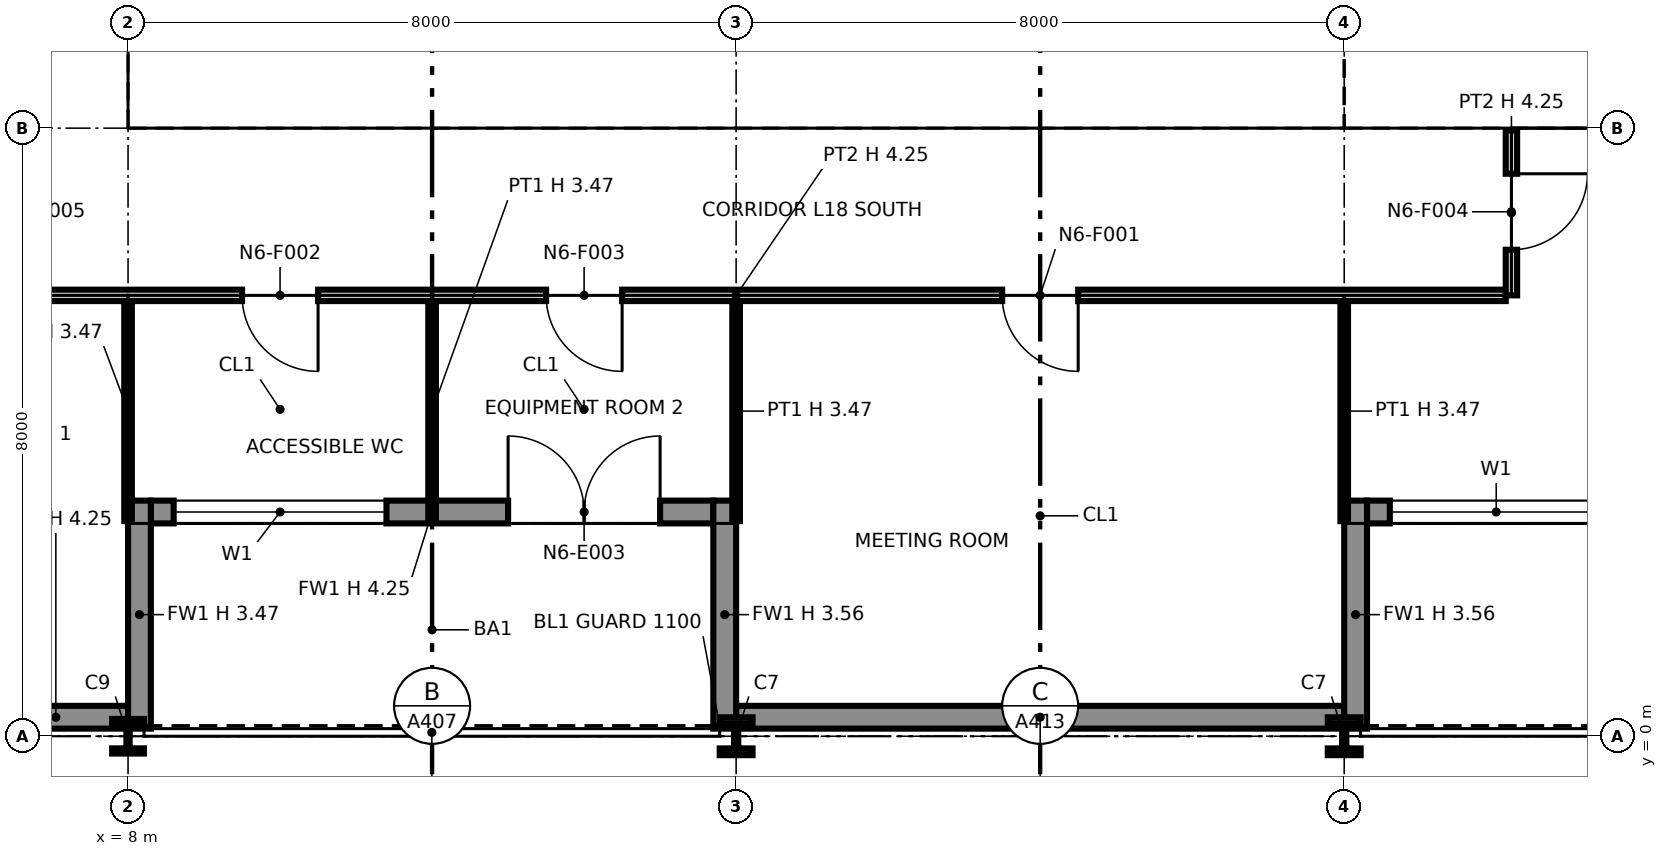
"""IFC4 building model, lengths in metres.
Left out: names, types, materials, properties, quantities, classifications, styles, units other than length and angle.
Written with IfcOpenShell. Run it as: python <this file> out.ifc"""

import sys

from ifc_helpers import new_model, si_unit, direction, frame, frame_2d, origin, origin_2d, place, context, subcontext, project, spatial, polyline, rectangle, i_section, outline, extrude, element, fill, save


model = new_model("IFC4")
c1 = context("Model", 3, precision=1e-05, world=origin(), true_north=direction((0.0, 1.0)))
c2 = subcontext(c1, "Body", "Model", "MODEL_VIEW")
j1 = project(units=[si_unit("LENGTHUNIT", "METRE"), si_unit("PLANEANGLEUNIT", "RADIAN")], contexts=[c1])
p1 = place(None, origin())
s1 = spatial("IfcSite", under=j1, at=p1, CompositionType="ELEMENT")
p2 = place(p1, origin())
s2 = spatial("IfcBuilding", under=s1, at=p2, CompositionType="ELEMENT")
p3 = place(p2, frame((0.0, 0.0, 96.4)))
s3 = spatial("IfcBuildingStorey", under=s2, at=p3, CompositionType="ELEMENT", Elevation=96.4)
p4 = place(p3, frame((8.0, 0.0, 0.0), z_axis=(0.0, 0.0, 1.0), x_axis=(1.0, 0.0, 0.0)))
e1 = element("IfcColumn", 1, at=p4, inside=s3, PredefinedType="COLUMN", context=c2, shape_type="SweptSolid", body=[
    extrude(i_section(OverallWidth=0.419, OverallDepth=0.455, WebThickness=0.042, FlangeThickness=0.068, at=origin_2d()), origin(), (0.0, 0.0, 1.0), 4.25),
])
p5 = place(p3, frame((8.0, 8.0, 0.0), z_axis=(0.0, 0.0, 1.0), x_axis=(1.0, 0.0, 0.0)))
e2 = element("IfcColumn", 2, at=p5, inside=s3, PredefinedType="COLUMN", context=c2, shape_type="SweptSolid", body=[
    extrude(i_section(OverallWidth=0.406, OverallDepth=0.417, WebThickness=0.03, FlangeThickness=0.048, at=origin_2d()), origin(), (0.0, 0.0, 1.0), 4.25),
])
p6 = place(p3, frame((16.0, 0.0, 0.0), z_axis=(0.0, 0.0, 1.0), x_axis=(1.0, 0.0, 0.0)))
e3 = element("IfcColumn", 3, at=p6, inside=s3, PredefinedType="COLUMN", context=c2, shape_type="SweptSolid", body=[
    extrude(i_section(OverallWidth=0.432, OverallDepth=0.498, WebThickness=0.056, FlangeThickness=0.089, at=origin_2d()), origin(), (0.0, 0.0, 1.0), 4.25),
])
p7 = place(p3, frame((16.0, 8.0, 0.0), z_axis=(0.0, 0.0, 1.0), x_axis=(1.0, 0.0, 0.0)))
e4 = element("IfcColumn", 4, at=p7, inside=s3, PredefinedType="COLUMN", context=c2, shape_type="SweptSolid", body=[
    extrude(i_section(OverallWidth=0.406, OverallDepth=0.417, WebThickness=0.03, FlangeThickness=0.048, at=origin_2d()), origin(), (0.0, 0.0, 1.0), 4.25),
])
p8 = place(p3, frame((24.0, 0.0, 0.0), z_axis=(0.0, 0.0, 1.0), x_axis=(1.0, 0.0, 0.0)))
e5 = element("IfcColumn", 5, at=p8, inside=s3, PredefinedType="COLUMN", context=c2, shape_type="SweptSolid", body=[
    extrude(i_section(OverallWidth=0.432, OverallDepth=0.498, WebThickness=0.056, FlangeThickness=0.089, at=origin_2d()), origin(), (0.0, 0.0, 1.0), 4.25),
])
p9 = place(p3, frame((24.0, 8.0, 0.0), z_axis=(0.0, 0.0, 1.0), x_axis=(1.0, 0.0, 0.0)))
e6 = element("IfcColumn", 6, at=p9, inside=s3, PredefinedType="COLUMN", context=c2, shape_type="SweptSolid", body=[
    extrude(i_section(OverallWidth=0.411, OverallDepth=0.434, WebThickness=0.036, FlangeThickness=0.057, at=origin_2d()), origin(), (0.0, 0.0, 1.0), 4.25),
])
p10 = place(p3, frame((6.1, 0.25, 0.0), z_axis=(0.0, 0.0, 1.0), x_axis=(1.0, 0.0, 0.0)))
e7 = element("IfcWall", 7, at=p10, inside=s3, PredefinedType="SOLIDWALL", context=c2, shape_type="SweptSolid", body=[
    extrude(rectangle(XDim=1.9, YDim=0.3, at=frame_2d((0.95, 0.0))), origin(), (0.0, 0.0, 1.0), 4.25),
])
p11 = place(p3, frame((8.3, 2.95, 0.0), z_axis=(0.0, 0.0, 1.0), x_axis=(1.0, 0.0, 0.0)))
e8 = element("IfcWall", 8, at=p11, inside=s3, PredefinedType="SOLIDWALL", context=c2, shape_type="SweptSolid", body=[
    extrude(rectangle(XDim=7.4, YDim=0.3, at=frame_2d((3.7, 0.0))), origin(), (0.0, 0.0, 1.0), 4.25),
])
p12 = place(p11, frame((0.3, 0.0, 0.9)))
e9 = element("IfcOpeningElement", 9, at=p12, cuts=e8, PredefinedType="OPENING", context=c2, shape_type="SweptSolid", body=[
    extrude(rectangle(XDim=2.8, YDim=2.2, at=frame_2d((1.4, 1.1))), frame((0.0, 0.16, 0.0), z_axis=(0.0, -1.0, 0.0), x_axis=(1.0, 0.0, 0.0)), (0.0, 0.0, 1.0), 0.32),
])
p13 = place(p11, frame((4.7, 0.0, 0.0)))
e10 = element("IfcOpeningElement", 10, at=p13, cuts=e8, PredefinedType="OPENING", context=c2, shape_type="SweptSolid", body=[
    extrude(rectangle(XDim=2.0, YDim=2.4, at=frame_2d((1.0, 1.2))), frame((0.0, 0.16, 0.0), z_axis=(0.0, -1.0, 0.0), x_axis=(1.0, 0.0, 0.0)), (0.0, 0.0, 1.0), 0.32),
])
p14 = place(p3, frame((8.15, 0.1, 0.0), z_axis=(0.0, 0.0, 1.0), x_axis=(0.0, 1.0, 0.0)))
e11 = element("IfcWall", 11, at=p14, inside=s3, PredefinedType="SOLIDWALL", context=c2, shape_type="SweptSolid", body=[
    extrude(rectangle(XDim=3.0, YDim=0.3, at=frame_2d((1.5, 0.0))), origin(), (0.0, 0.0, 1.0), 3.469),
])
p15 = place(p3, frame((15.85, 0.1, 0.0), z_axis=(0.0, 0.0, 1.0), x_axis=(0.0, 1.0, 0.0)))
e12 = element("IfcWall", 12, at=p15, inside=s3, PredefinedType="SOLIDWALL", context=c2, shape_type="SweptSolid", body=[
    extrude(rectangle(XDim=3.0, YDim=0.3, at=frame_2d((1.5, 0.0))), origin(), (0.0, 0.0, 1.0), 3.556),
])
p16 = place(p3, frame((16.0, 0.25, 0.0), z_axis=(0.0, 0.0, 1.0), x_axis=(1.0, 0.0, 0.0)))
e13 = element("IfcWall", 13, at=p16, inside=s3, PredefinedType="SOLIDWALL", context=c2, shape_type="SweptSolid", body=[
    extrude(rectangle(XDim=8.0, YDim=0.3, at=frame_2d((4.0, 0.0))), origin(), (0.0, 0.0, 1.0), 4.25),
])
p17 = place(p3, frame((24.3, 2.95, 0.0), z_axis=(0.0, 0.0, 1.0), x_axis=(1.0, 0.0, 0.0)))
e14 = element("IfcWall", 14, at=p17, inside=s3, PredefinedType="SOLIDWALL", context=c2, shape_type="SweptSolid", body=[
    extrude(rectangle(XDim=7.4, YDim=0.3, at=frame_2d((3.7, 0.0))), origin(), (0.0, 0.0, 1.0), 4.25),
])
p18 = place(p17, frame((0.3, 0.0, 0.9)))
e15 = element("IfcOpeningElement", 15, at=p18, cuts=e14, PredefinedType="OPENING", context=c2, shape_type="SweptSolid", body=[
    extrude(rectangle(XDim=2.8, YDim=2.2, at=frame_2d((1.4, 1.1))), frame((0.0, 0.16, 0.0), z_axis=(0.0, -1.0, 0.0), x_axis=(1.0, 0.0, 0.0)), (0.0, 0.0, 1.0), 0.32),
])
p19 = place(p17, frame((4.7, 0.0, 0.0)))
e16 = element("IfcOpeningElement", 16, at=p19, cuts=e14, PredefinedType="OPENING", context=c2, shape_type="SweptSolid", body=[
    extrude(rectangle(XDim=2.0, YDim=2.4, at=frame_2d((1.0, 1.2))), frame((0.0, 0.16, 0.0), z_axis=(0.0, -1.0, 0.0), x_axis=(1.0, 0.0, 0.0)), (0.0, 0.0, 1.0), 0.32),
])
p20 = place(p3, frame((24.15, 0.1, 0.0), z_axis=(0.0, 0.0, 1.0), x_axis=(0.0, 1.0, 0.0)))
e17 = element("IfcWall", 17, at=p20, inside=s3, PredefinedType="SOLIDWALL", context=c2, shape_type="SweptSolid", body=[
    extrude(rectangle(XDim=3.0, YDim=0.3, at=frame_2d((1.5, 0.0))), origin(), (0.0, 0.0, 1.0), 3.556),
])
p21 = place(p3, frame((8.65, 8.75, 0.0), z_axis=(0.0, 0.0, 1.0), x_axis=(1.0, 0.0, 0.0)))
e18 = element("IfcWall", 18, at=p21, inside=s3, PredefinedType="PARTITIONING", context=c2, shape_type="SweptSolid", body=[
    extrude(outline(polyline([(0.0, 0.0), (14.7, 0.0), (14.7, 4.25), (7.469, 4.25), (7.469, 3.632), (7.231, 3.632), (7.23, 4.25), (0.0, 4.25), (0.0, 0.0)])), frame((0.0, 0.1, 0.0), z_axis=(0.0, -1.0, 0.0), x_axis=(1.0, 0.0, 0.0)), (0.0, 0.0, 1.0), 0.2),
])
p22 = place(p21, frame((1.3, 0.0, 0.0)))
e19 = element("IfcOpeningElement", 19, at=p22, cuts=e18, PredefinedType="OPENING", context=c2, shape_type="SweptSolid", body=[
    extrude(rectangle(XDim=1.4, YDim=2.1, at=frame_2d((0.7, 1.05))), frame((0.0, 0.11, 0.0), z_axis=(0.0, -1.0, 0.0), x_axis=(1.0, 0.0, 0.0)), (0.0, 0.0, 1.0), 0.22),
])
p23 = place(p21, frame((4.6, 0.0, 0.0)))
e20 = element("IfcOpeningElement", 20, at=p23, cuts=e18, PredefinedType="OPENING", context=c2, shape_type="SweptSolid", body=[
    extrude(rectangle(XDim=1.4, YDim=2.1, at=frame_2d((0.7, 1.05))), frame((0.0, 0.11, 0.0), z_axis=(0.0, -1.0, 0.0), x_axis=(1.0, 0.0, 0.0)), (0.0, 0.0, 1.0), 0.22),
])
p24 = place(p21, frame((10.4, 0.0, 0.0)))
e21 = element("IfcOpeningElement", 21, at=p24, cuts=e18, PredefinedType="OPENING", context=c2, shape_type="SweptSolid", body=[
    extrude(rectangle(XDim=1.2, YDim=2.1, at=frame_2d((0.6, 1.05))), frame((0.0, 0.11, 0.0), z_axis=(0.0, -1.0, 0.0), x_axis=(1.0, 0.0, 0.0)), (0.0, 0.0, 1.0), 0.22),
])
p25 = place(p3, frame((8.75, 8.85, 0.0), z_axis=(0.0, 0.0, 1.0), x_axis=(0.0, 1.0, 0.0)))
e22 = element("IfcWall", 22, at=p25, inside=s3, PredefinedType="PARTITIONING", context=c2, shape_type="SweptSolid", body=[
    extrude(outline(polyline([(0.0, 0.0), (14.3, 0.0), (14.3, 4.25), (10.231, 4.25), (10.23, 3.789), (10.07, 3.789), (10.069, 4.25), (7.27, 4.25), (7.269, 3.632), (7.031, 3.632), (7.031, 4.25), (0.0, 4.25), (0.0, 0.0)])), frame((0.0, 0.1, 0.0), z_axis=(0.0, -1.0, 0.0), x_axis=(1.0, 0.0, 0.0)), (0.0, 0.0, 1.0), 0.2),
])
p26 = place(p25, frame((8.3, 0.0, 0.0)))
e23 = element("IfcOpeningElement", 23, at=p26, cuts=e22, PredefinedType="OPENING", context=c2, shape_type="SweptSolid", body=[
    extrude(rectangle(XDim=1.8, YDim=2.1, at=frame_2d((0.9, 1.05))), frame((0.0, 0.11, 0.0), z_axis=(0.0, -1.0, 0.0), x_axis=(1.0, 0.0, 0.0)), (0.0, 0.0, 1.0), 0.22),
])
p27 = place(p3, frame((12.4, 8.85, 0.0), z_axis=(0.0, 0.0, 1.0), x_axis=(0.0, 1.0, 0.0)))
e24 = element("IfcWall", 24, at=p27, inside=s3, PredefinedType="PARTITIONING", context=c2, shape_type="SweptSolid", body=[
    extrude(rectangle(XDim=6.85, YDim=0.2, at=frame_2d((3.425, 0.0))), origin(), (0.0, 0.0, 1.0), 4.25),
])
p28 = place(p3, frame((15.85, 8.85, 0.0), z_axis=(0.0, 0.0, 1.0), x_axis=(0.0, 1.0, 0.0)))
e25 = element("IfcWall", 25, at=p28, inside=s3, PredefinedType="PARTITIONING", context=c2, shape_type="SweptSolid", body=[
    extrude(rectangle(XDim=1.55, YDim=0.9, at=frame_2d((0.775, 0.0))), origin(), (0.0, 0.0, 1.0), 3.632),
])
p29 = place(p28, frame((0.3, 0.0, 0.0)))
e26 = element("IfcOpeningElement", 26, at=p29, cuts=e25, PredefinedType="OPENING", context=c2, shape_type="SweptSolid", body=[
    extrude(rectangle(XDim=1.1, YDim=2.1, at=frame_2d((0.55, 1.05))), frame((0.0, 0.46, 0.0), z_axis=(0.0, -1.0, 0.0), x_axis=(1.0, 0.0, 0.0)), (0.0, 0.0, 1.0), 0.92),
])
p30 = place(p3, frame((23.25, 8.85, 0.0), z_axis=(0.0, 0.0, 1.0), x_axis=(0.0, 1.0, 0.0)))
e27 = element("IfcWall", 27, at=p30, inside=s3, PredefinedType="PARTITIONING", context=c2, shape_type="SweptSolid", body=[
    extrude(outline(polyline([(0.0, 0.0), (14.3, 0.0), (14.3, 4.25), (11.231, 4.25), (11.23, 3.789), (11.07, 3.789), (11.069, 4.25), (7.27, 4.25), (7.269, 3.632), (7.031, 3.632), (7.031, 4.25), (1.231, 4.25), (1.23, 3.789), (1.07, 3.789), (1.069, 4.25), (0.0, 4.25), (0.0, 0.0)])), frame((0.0, 0.1, 0.0), z_axis=(0.0, -1.0, 0.0), x_axis=(1.0, 0.0, 0.0)), (0.0, 0.0, 1.0), 0.2),
])
p31 = place(p30, frame((8.3, 0.0, 0.0)))
e28 = element("IfcOpeningElement", 28, at=p31, cuts=e27, PredefinedType="OPENING", context=c2, shape_type="SweptSolid", body=[
    extrude(rectangle(XDim=1.8, YDim=2.1, at=frame_2d((0.9, 1.05))), frame((0.0, 0.11, 0.0), z_axis=(0.0, -1.0, 0.0), x_axis=(1.0, 0.0, 0.0)), (0.0, 0.0, 1.0), 0.22),
])
p32 = place(p3, frame((24.65, 8.75, 0.0), z_axis=(0.0, 0.0, 1.0), x_axis=(1.0, 0.0, 0.0)))
e29 = element("IfcWall", 29, at=p32, inside=s3, PredefinedType="PARTITIONING", context=c2, shape_type="SweptSolid", body=[
    extrude(outline(polyline([(0.0, 0.0), (14.7, 0.0), (14.7, 4.25), (7.469, 4.25), (7.469, 3.632), (7.231, 3.632), (7.23, 4.25), (0.0, 4.25), (0.0, 0.0)])), frame((0.0, 0.1, 0.0), z_axis=(0.0, -1.0, 0.0), x_axis=(1.0, 0.0, 0.0)), (0.0, 0.0, 1.0), 0.2),
])
p33 = place(p3, frame((24.75, 8.85, 0.0), z_axis=(0.0, 0.0, 1.0), x_axis=(0.0, 1.0, 0.0)))
e30 = element("IfcWall", 30, at=p33, inside=s3, PredefinedType="PARTITIONING", context=c2, shape_type="SweptSolid", body=[
    extrude(outline(polyline([(0.0, 0.0), (6.3, 0.0), (6.3, 4.25), (3.231, 4.25), (3.23, 3.789), (3.07, 3.789), (3.069, 4.25), (0.0, 4.25), (0.0, 0.0)])), frame((0.0, 0.1, 0.0), z_axis=(0.0, -1.0, 0.0), x_axis=(1.0, 0.0, 0.0)), (0.0, 0.0, 1.0), 0.2),
])
for number, where, z_axis, x_axis in (
    (31, (8.0, 2.83, 0.0), (0.0, 0.0, 1.0), (0.0, 1.0, 0.0)),
    (32, (12.0, 2.83, 0.0), (0.0, 0.0, 1.0), (0.0, 1.0, 0.0)),
    (33, (16.0, 2.83, 0.0), (0.0, 0.0, 1.0), (0.0, 1.0, 0.0)),
    (34, (24.0, 2.83, 0.0), (0.0, 0.0, 1.0), (0.0, 1.0, 0.0)),
):
    element("IfcWall", number, at=place(p3, frame(where, z_axis=z_axis, x_axis=x_axis)), inside=s3, PredefinedType="PARTITIONING", context=c2, shape_type="SweptSolid", body=[
        extrude(rectangle(XDim=2.895, YDim=0.1, at=frame_2d((1.448, 0.0))), origin(), (0.0, 0.0, 1.0), 3.47),
    ])
p34 = place(p3, frame((5.875, 5.8, 0.0), z_axis=(0.0, 0.0, 1.0), x_axis=(1.0, 0.0, 0.0)))
e35 = element("IfcWall", 35, at=p34, inside=s3, PredefinedType="PARTITIONING", context=c2, shape_type="SweptSolid", body=[
    extrude(rectangle(XDim=20.25, YDim=0.15, at=frame_2d((10.125, 0.0))), origin(), (0.0, 0.0, 1.0), 4.25),
])
p35 = place(p34, frame((14.625, 0.0, 0.0), z_axis=(0.0, 0.0, 1.0), x_axis=(-1.0, 0.0, 0.0)))
e36 = element("IfcOpeningElement", 36, at=p35, cuts=e35, PredefinedType="OPENING", context=c2, shape_type="SweptSolid", body=[
    extrude(rectangle(XDim=1.0, YDim=2.1, at=frame_2d((0.5, 1.05))), frame((0.0, 0.085, 0.0), z_axis=(0.0, -1.0, 0.0), x_axis=(1.0, 0.0, 0.0)), (0.0, 0.0, 1.0), 0.17),
])
p36 = place(p34, frame((4.625, 0.0, 0.0), z_axis=(0.0, 0.0, 1.0), x_axis=(-1.0, 0.0, 0.0)))
e37 = element("IfcOpeningElement", 37, at=p36, cuts=e35, PredefinedType="OPENING", context=c2, shape_type="SweptSolid", body=[
    extrude(rectangle(XDim=1.0, YDim=2.1, at=frame_2d((0.5, 1.05))), frame((0.0, 0.085, 0.0), z_axis=(0.0, -1.0, 0.0), x_axis=(1.0, 0.0, 0.0)), (0.0, 0.0, 1.0), 0.17),
])
p37 = place(p34, frame((8.625, 0.0, 0.0), z_axis=(0.0, 0.0, 1.0), x_axis=(-1.0, 0.0, 0.0)))
e38 = element("IfcOpeningElement", 38, at=p37, cuts=e35, PredefinedType="OPENING", context=c2, shape_type="SweptSolid", body=[
    extrude(rectangle(XDim=1.0, YDim=2.1, at=frame_2d((0.5, 1.05))), frame((0.0, 0.085, 0.0), z_axis=(0.0, -1.0, 0.0), x_axis=(1.0, 0.0, 0.0)), (0.0, 0.0, 1.0), 0.17),
])
p38 = place(p3, frame((26.2, 5.8, 0.0), z_axis=(0.0, 0.0, 1.0), x_axis=(0.0, 1.0, 0.0)))
e39 = element("IfcWall", 39, at=p38, inside=s3, PredefinedType="PARTITIONING", context=c2, shape_type="SweptSolid", body=[
    extrude(rectangle(XDim=2.17, YDim=0.15, at=frame_2d((1.085, 0.0))), origin(), (0.0, 0.0, 1.0), 4.25),
])
p39 = place(p38, frame((1.6, 0.0, 0.0), z_axis=(0.0, 0.0, 1.0), x_axis=(-1.0, 0.0, 0.0)))
e40 = element("IfcOpeningElement", 40, at=p39, cuts=e39, PredefinedType="OPENING", context=c2, shape_type="SweptSolid", body=[
    extrude(rectangle(XDim=1.0, YDim=2.1, at=frame_2d((0.5, 1.05))), frame((0.0, 0.085, 0.0), z_axis=(0.0, -1.0, 0.0), x_axis=(1.0, 0.0, 0.0)), (0.0, 0.0, 1.0), 0.17),
])
p40 = place(p12, origin())
e41 = element("IfcWindow", 41, at=p40, inside=s3, PartitioningType="SINGLE_PANEL", PredefinedType="WINDOW", context=c2, shape_type="SweptSolid", body=[
    extrude(rectangle(XDim=2.8, YDim=2.2, at=frame_2d((1.4, 1.1))), frame((0.0, 0.03, 0.0), z_axis=(0.0, -1.0, 0.0), x_axis=(1.0, 0.0, 0.0)), (0.0, 0.0, 1.0), 0.06),
])
fill(e9, e41)
p41 = place(p13, origin())
e42 = element("IfcDoor", 42, at=p41, inside=s3, OperationType="DOUBLE_DOOR_SINGLE_SWING", PredefinedType="DOOR", context=c2, shape_type="SweptSolid", body=[
    extrude(rectangle(XDim=2.0, YDim=2.4, at=frame_2d((1.0, 1.2))), frame((0.0, 0.025, 0.0), z_axis=(0.0, -1.0, 0.0), x_axis=(1.0, 0.0, 0.0)), (0.0, 0.0, 1.0), 0.05),
])
fill(e10, e42)
p42 = place(p18, origin())
e43 = element("IfcWindow", 43, at=p42, inside=s3, PartitioningType="SINGLE_PANEL", PredefinedType="WINDOW", context=c2, shape_type="SweptSolid", body=[
    extrude(rectangle(XDim=2.8, YDim=2.2, at=frame_2d((1.4, 1.1))), frame((0.0, 0.03, 0.0), z_axis=(0.0, -1.0, 0.0), x_axis=(1.0, 0.0, 0.0)), (0.0, 0.0, 1.0), 0.06),
])
fill(e15, e43)
p43 = place(p22, origin())
e44 = element("IfcDoor", 44, at=p43, inside=s3, OperationType="DOUBLE_DOOR_SINGLE_SWING", PredefinedType="NOTDEFINED", context=c2, shape_type="SweptSolid", body=[
    extrude(rectangle(XDim=1.4, YDim=2.1, at=frame_2d((0.7, 1.05))), frame((0.0, 0.025, 0.0), z_axis=(0.0, -1.0, 0.0), x_axis=(1.0, 0.0, 0.0)), (0.0, 0.0, 1.0), 0.05),
])
fill(e19, e44)
p44 = place(p23, origin())
e45 = element("IfcDoor", 45, at=p44, inside=s3, OperationType="DOUBLE_DOOR_SINGLE_SWING", PredefinedType="NOTDEFINED", context=c2, shape_type="SweptSolid", body=[
    extrude(rectangle(XDim=1.4, YDim=2.1, at=frame_2d((0.7, 1.05))), frame((0.0, 0.025, 0.0), z_axis=(0.0, -1.0, 0.0), x_axis=(1.0, 0.0, 0.0)), (0.0, 0.0, 1.0), 0.05),
])
fill(e20, e45)
p45 = place(p24, origin())
e46 = element("IfcDoor", 46, at=p45, inside=s3, OperationType="SINGLE_SWING_LEFT", PredefinedType="NOTDEFINED", context=c2, shape_type="SweptSolid", body=[
    extrude(rectangle(XDim=1.2, YDim=2.1, at=frame_2d((0.6, 1.05))), frame((0.0, 0.025, 0.0), z_axis=(0.0, -1.0, 0.0), x_axis=(1.0, 0.0, 0.0)), (0.0, 0.0, 1.0), 0.05),
])
fill(e21, e46)
p46 = place(p35, origin())
e47 = element("IfcDoor", 47, at=p46, inside=s3, OperationType="SINGLE_SWING_LEFT", PredefinedType="DOOR", context=c2, shape_type="SweptSolid", body=[
    extrude(rectangle(XDim=1.0, YDim=2.1, at=frame_2d((0.5, 1.05))), frame((0.0, 0.025, 0.0), z_axis=(0.0, -1.0, 0.0), x_axis=(1.0, 0.0, 0.0)), (0.0, 0.0, 1.0), 0.05),
])
fill(e36, e47)
p47 = place(p36, origin())
e48 = element("IfcDoor", 48, at=p47, inside=s3, OperationType="SINGLE_SWING_LEFT", PredefinedType="DOOR", context=c2, shape_type="SweptSolid", body=[
    extrude(rectangle(XDim=1.0, YDim=2.1, at=frame_2d((0.5, 1.05))), frame((0.0, 0.025, 0.0), z_axis=(0.0, -1.0, 0.0), x_axis=(1.0, 0.0, 0.0)), (0.0, 0.0, 1.0), 0.05),
])
fill(e37, e48)
p48 = place(p37, origin())
e49 = element("IfcDoor", 49, at=p48, inside=s3, OperationType="SINGLE_SWING_LEFT", PredefinedType="DOOR", context=c2, shape_type="SweptSolid", body=[
    extrude(rectangle(XDim=1.0, YDim=2.1, at=frame_2d((0.5, 1.05))), frame((0.0, 0.025, 0.0), z_axis=(0.0, -1.0, 0.0), x_axis=(1.0, 0.0, 0.0)), (0.0, 0.0, 1.0), 0.05),
])
fill(e38, e49)
p49 = place(p39, origin())
e50 = element("IfcDoor", 50, at=p49, inside=s3, OperationType="SINGLE_SWING_LEFT", PredefinedType="DOOR", context=c2, shape_type="SweptSolid", body=[
    extrude(rectangle(XDim=1.0, YDim=2.1, at=frame_2d((0.5, 1.05))), frame((0.0, 0.025, 0.0), z_axis=(0.0, -1.0, 0.0), x_axis=(1.0, 0.0, 0.0)), (0.0, 0.0, 1.0), 0.05),
])
fill(e40, e50)
save(model, sys.argv[1])
